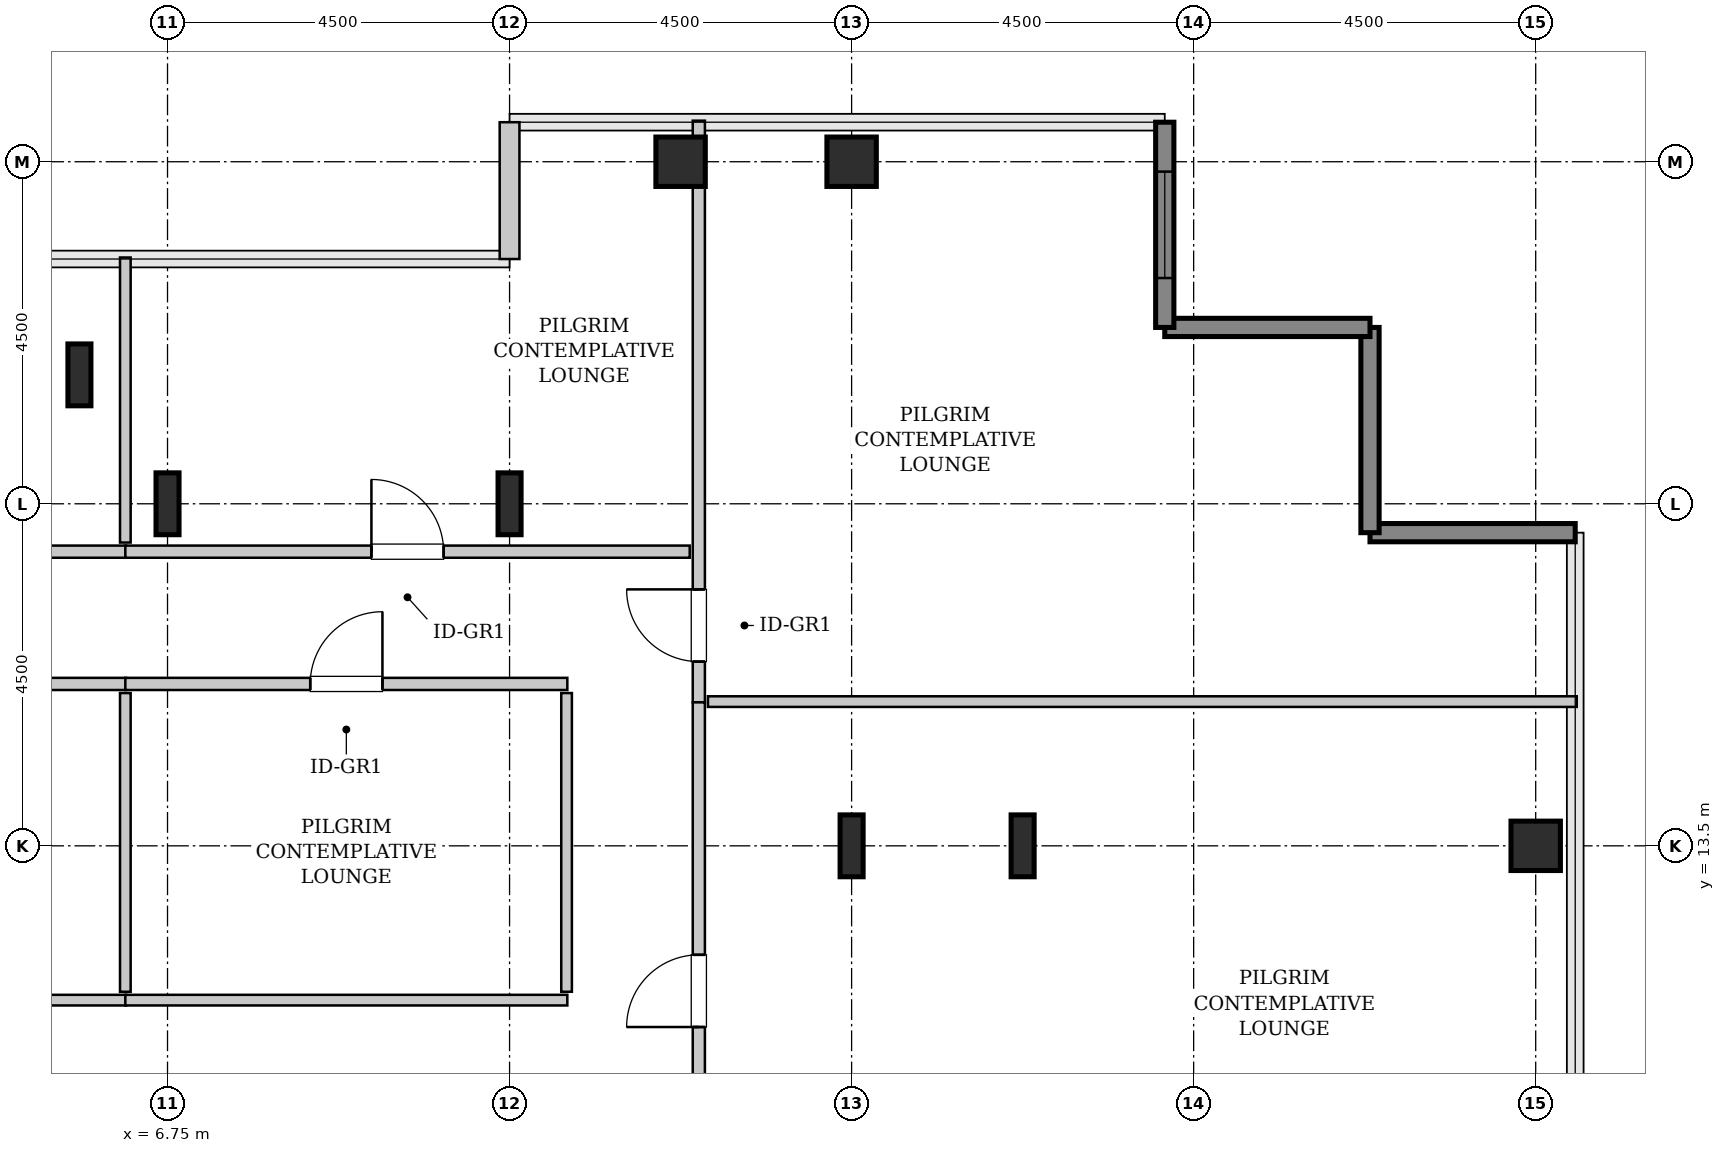
"""IFC4 building model, lengths in metres.
Left out: names, types, materials, properties, quantities, classifications, styles, units other than length and angle.
Written with IfcOpenShell. Run it as: python <this file> out.ifc"""

import sys

from ifc_helpers import new_model, si_unit, direction, frame, frame_2d, origin, origin_2d, place, context, subcontext, project, spatial, rectangle, hollow_rectangle, i_section, extrude, source, transform, mapped, element, fill, save


model = new_model("IFC4")
c1 = context("Model", 3, precision=1e-05, world=origin(), true_north=direction((0.0, 1.0)))
c2 = subcontext(c1, "Body", "Model", "MODEL_VIEW")
j1 = project(units=[si_unit("LENGTHUNIT", "METRE"), si_unit("PLANEANGLEUNIT", "RADIAN")], contexts=[c1])
p1 = place(None, origin())
s1 = spatial("IfcSite", under=j1, at=p1, CompositionType="ELEMENT")
p2 = place(p1, origin())
s2 = spatial("IfcBuilding", under=s1, at=p2, CompositionType="ELEMENT")
p3 = place(p2, frame((0.0, 0.0, 237.0)))
s3 = spatial("IfcBuildingStorey", under=s2, at=p3, CompositionType="ELEMENT", Elevation=237.0)
m1 = source(origin(), c2, "Body", "SweptSolid", [
    extrude(i_section(OverallWidth=0.303, OverallDepth=0.814, WebThickness=0.021, FlangeThickness=0.04, FilletRadius=0.03, at=origin_2d()), origin(), (0.0, 0.0, 1.0), 3.8),
])
for number, where, z_axis, x_axis in (
    (1, (5.591, 19.696, 0.0), (0.0, 0.0, 1.0), (1.0, 0.0, 0.0)),
    (2, (6.75, 18.0, 0.0), (0.0, 0.0, 1.0), (1.0, 0.0, 0.0)),
    (3, (11.25, 18.0, 0.0), (0.0, 0.0, 1.0), (1.0, 0.0, 0.0)),
):
    element("IfcColumn", number, at=place(p3, frame(where, z_axis=z_axis, x_axis=x_axis)), inside=s3, PredefinedType="COLUMN", context=c2, shape_type="MappedRepresentation", body=[
        mapped(m1, transform((0.0, 0.0, 0.0), x_axis=(1.0, 0.0, 0.0), y_axis=(0.0, 1.0, 0.0), z_axis=(0.0, 0.0, 1.0), scale=1.0)),
    ])
m2 = source(origin(), c2, "Body", "SweptSolid", [
    extrude(hollow_rectangle(XDim=0.65, YDim=0.65, WallThickness=0.032, InnerFilletRadius=0.032, OuterFilletRadius=0.064, at=origin_2d()), origin(), (0.0, 0.0, 1.0), 3.8),
])
p4 = place(p3, frame((13.5, 22.5, 0.0), z_axis=(0.0, 0.0, 1.0), x_axis=(1.0, 0.0, 0.0)))
e4 = element("IfcColumn", 4, at=p4, inside=s3, PredefinedType="COLUMN", context=c2, shape_type="MappedRepresentation", body=[
    mapped(m2, transform((0.0, 0.0, 0.0), x_axis=(1.0, 0.0, 0.0), y_axis=(0.0, 1.0, 0.0), z_axis=(0.0, 0.0, 1.0), scale=1.0)),
])
p5 = place(p3, frame((15.75, 13.5, 0.0), z_axis=(0.0, 0.0, 1.0), x_axis=(1.0, 0.0, 0.0)))
e5 = element("IfcColumn", 5, at=p5, inside=s3, PredefinedType="COLUMN", context=c2, shape_type="MappedRepresentation", body=[
    mapped(m1, transform((0.0, 0.0, 0.0), x_axis=(1.0, 0.0, 0.0), y_axis=(0.0, 1.0, 0.0), z_axis=(0.0, 0.0, 1.0), scale=1.0)),
])
p6 = place(p3, frame((15.75, 22.5, 0.0), z_axis=(0.0, 0.0, 1.0), x_axis=(1.0, 0.0, 0.0)))
e6 = element("IfcColumn", 6, at=p6, inside=s3, PredefinedType="COLUMN", context=c2, shape_type="MappedRepresentation", body=[
    mapped(m2, transform((0.0, 0.0, 0.0), x_axis=(1.0, 0.0, 0.0), y_axis=(0.0, 1.0, 0.0), z_axis=(0.0, 0.0, 1.0), scale=1.0)),
])
p7 = place(p3, frame((18.0, 13.5, 0.0), z_axis=(0.0, 0.0, 1.0), x_axis=(1.0, 0.0, 0.0)))
e7 = element("IfcColumn", 7, at=p7, inside=s3, PredefinedType="COLUMN", context=c2, shape_type="MappedRepresentation", body=[
    mapped(m1, transform((0.0, 0.0, 0.0), x_axis=(1.0, 0.0, 0.0), y_axis=(0.0, 1.0, 0.0), z_axis=(0.0, 0.0, 1.0), scale=1.0)),
])
p8 = place(p3, frame((24.75, 13.5, 0.0), z_axis=(0.0, 0.0, 1.0), x_axis=(1.0, 0.0, 0.0)))
e8 = element("IfcColumn", 8, at=p8, inside=s3, PredefinedType="COLUMN", context=c2, shape_type="MappedRepresentation", body=[
    mapped(m2, transform((0.0, 0.0, 0.0), x_axis=(1.0, 0.0, 0.0), y_axis=(0.0, 1.0, 0.0), z_axis=(0.0, 0.0, 1.0), scale=1.0)),
])
m3 = source(origin(), c2, "Body", "SweptSolid", [
    extrude(rectangle(XDim=2.7, YDim=0.24, at=frame_2d((1.35, 0.0))), origin(), (0.0, 0.0, 1.0), 3.55),
])
for number, where, z_axis, x_axis in (
    (9, (25.27, 17.62, 0.0), (0.0, 0.0, 1.0), (-1.0, 0.0, 0.0)),
    (10, (22.57, 17.62, 0.0), (0.0, 0.0, 1.0), (0.0, 1.0, 0.0)),
    (11, (22.57, 20.32, 0.0), (0.0, 0.0, 1.0), (-1.0, 0.0, 0.0)),
):
    element("IfcWall", number, at=place(p3, frame(where, z_axis=z_axis, x_axis=x_axis)), inside=s3, PredefinedType="SHEAR", context=c2, shape_type="MappedRepresentation", body=[
        mapped(m3, transform((0.0, 0.0, 0.0), x_axis=(1.0, 0.0, 0.0), y_axis=(0.0, 1.0, 0.0), z_axis=(0.0, 0.0, 1.0), scale=1.0)),
    ])
p9 = place(p3, frame((19.87, 20.32, 0.0), z_axis=(0.0, 0.0, 1.0), x_axis=(0.0, 1.0, 0.0)))
e12 = element("IfcWall", 12, at=p9, inside=s3, PredefinedType="SHEAR", context=c2, shape_type="MappedRepresentation", body=[
    mapped(m3, transform((0.0, 0.0, 0.0), x_axis=(1.0, 0.0, 0.0), y_axis=(0.0, 1.0, 0.0), z_axis=(0.0, 0.0, 1.0), scale=1.0)),
])
p10 = place(p9, frame((0.65, 0.0, 0.85)))
e13 = element("IfcOpeningElement", 13, at=p10, cuts=e12, PredefinedType="OPENING", context=c2, shape_type="SweptSolid", body=[
    extrude(rectangle(XDim=1.4, YDim=1.8, at=frame_2d((0.7, 0.9))), frame((0.0, 0.13, 0.0), z_axis=(0.0, -1.0, 0.0), x_axis=(1.0, 0.0, 0.0)), (0.0, 0.0, 1.0), 0.26),
])
m4 = source(origin(), c2, "Body", "SweptSolid", [
    extrude(rectangle(XDim=1.8, YDim=0.26, at=frame_2d((0.9, 0.0))), origin(), (0.0, 0.0, 1.0), 3.55),
])
p11 = place(p3, frame((11.25, 23.02, 0.0), z_axis=(0.0, 0.0, 1.0), x_axis=(0.0, -1.0, 0.0)))
e14 = element("IfcWall", 14, at=p11, inside=s3, PredefinedType="SOLIDWALL", context=c2, shape_type="MappedRepresentation", body=[
    mapped(m4, transform((0.0, 0.0, 0.0), x_axis=(1.0, 0.0, 0.0), y_axis=(0.0, 1.0, 0.0), z_axis=(0.0, 0.0, 1.0), scale=1.0)),
])
m5 = source(origin(), c2, "Body", "SweptSolid", [
    extrude(rectangle(XDim=7.653, YDim=0.16, at=frame_2d((3.826, 0.0))), origin(), (0.0, 0.0, 1.0), 3.535),
])
p12 = place(p3, frame((13.74, 15.387, 0.0), z_axis=(0.0, 0.0, 1.0), x_axis=(0.0, 1.0, 0.0)))
e15 = element("IfcWall", 15, at=p12, inside=s3, PredefinedType="PARTITIONING", context=c2, shape_type="MappedRepresentation", body=[
    mapped(m5, transform((0.0, 0.0, 0.0), x_axis=(1.0, 0.0, 0.0), y_axis=(0.0, 1.0, 0.0), z_axis=(0.0, 0.0, 1.0), scale=1.0)),
])
p13 = place(p12, frame((0.536, 0.0, 0.0)))
e16 = element("IfcOpeningElement", 16, at=p13, cuts=e15, PredefinedType="OPENING", context=c2, shape_type="SweptSolid", body=[
    extrude(rectangle(XDim=0.95, YDim=2.1, at=frame_2d((0.475, 1.05))), frame((0.0, 0.09, 0.0), z_axis=(0.0, -1.0, 0.0), x_axis=(1.0, 0.0, 0.0)), (0.0, 0.0, 1.0), 0.18),
])
m6 = source(origin(), c2, "Body", "SweptSolid", [
    extrude(rectangle(XDim=11.43, YDim=0.14, at=frame_2d((5.715, 0.0))), origin(), (0.0, 0.0, 1.0), 3.535),
])
p14 = place(p3, frame((13.86, 15.397, 0.0), z_axis=(0.0, 0.0, 1.0), x_axis=(1.0, 0.0, 0.0)))
e17 = element("IfcWall", 17, at=p14, inside=s3, PredefinedType="PARTITIONING", context=c2, shape_type="MappedRepresentation", body=[
    mapped(m6, transform((0.0, 0.0, 0.0), x_axis=(1.0, 0.0, 0.0), y_axis=(0.0, 1.0, 0.0), z_axis=(0.0, 0.0, 1.0), scale=1.0)),
])
m7 = source(origin(), c2, "Body", "SweptSolid", [
    extrude(rectangle(XDim=7.593, YDim=0.16, at=frame_2d((3.796, 0.0))), origin(), (0.0, 0.0, 1.0), 3.535),
])
p15 = place(p3, frame((13.74, 7.795, 0.0), z_axis=(0.0, 0.0, 1.0), x_axis=(0.0, 1.0, 0.0)))
e18 = element("IfcWall", 18, at=p15, inside=s3, PredefinedType="PARTITIONING", context=c2, shape_type="MappedRepresentation", body=[
    mapped(m7, transform((0.0, 0.0, 0.0), x_axis=(1.0, 0.0, 0.0), y_axis=(0.0, 1.0, 0.0), z_axis=(0.0, 0.0, 1.0), scale=1.0)),
])
p16 = place(p15, frame((3.321, 0.0, 0.0)))
e19 = element("IfcOpeningElement", 19, at=p16, cuts=e18, PredefinedType="OPENING", context=c2, shape_type="SweptSolid", body=[
    extrude(rectangle(XDim=0.95, YDim=2.1, at=frame_2d((0.475, 1.05))), frame((0.0, 0.09, 0.0), z_axis=(0.0, -1.0, 0.0), x_axis=(1.0, 0.0, 0.0)), (0.0, 0.0, 1.0), 0.18),
])
m8 = source(origin(), c2, "Body", "SweptSolid", [
    extrude(rectangle(XDim=8.01, YDim=0.16, at=frame_2d((4.005, 0.0))), origin(), (0.0, 0.0, 1.0), 3.535),
])
p17 = place(p3, frame((-1.805, 17.37, 0.0), z_axis=(0.0, 0.0, 1.0), x_axis=(1.0, 0.0, 0.0)))
e20 = element("IfcWall", 20, at=p17, inside=s3, PredefinedType="PARTITIONING", context=c2, shape_type="MappedRepresentation", body=[
    mapped(m8, transform((0.0, 0.0, 0.0), x_axis=(1.0, 0.0, 0.0), y_axis=(0.0, 1.0, 0.0), z_axis=(0.0, 0.0, 1.0), scale=1.0)),
])
p18 = place(p17, frame((2.49, 0.0, 0.0)))
e21 = element("IfcOpeningElement", 21, at=p18, cuts=e20, PredefinedType="OPENING", context=c2, shape_type="SweptSolid", body=[
    extrude(rectangle(XDim=0.95, YDim=2.1, at=frame_2d((0.475, 1.05))), frame((0.0, 0.09, 0.0), z_axis=(0.0, -1.0, 0.0), x_axis=(1.0, 0.0, 0.0)), (0.0, 0.0, 1.0), 0.18),
])
m9 = source(origin(), c2, "Body", "SweptSolid", [
    extrude(rectangle(XDim=3.75, YDim=0.14, at=frame_2d((1.875, 0.0))), origin(), (0.0, 0.0, 1.0), 3.535),
])
p19 = place(p3, frame((6.195, 17.49, 0.0), z_axis=(0.0, 0.0, 1.0), x_axis=(0.0, 1.0, 0.0)))
e22 = element("IfcWall", 22, at=p19, inside=s3, PredefinedType="PARTITIONING", context=c2, shape_type="MappedRepresentation", body=[
    mapped(m9, transform((0.0, 0.0, 0.0), x_axis=(1.0, 0.0, 0.0), y_axis=(0.0, 1.0, 0.0), z_axis=(0.0, 0.0, 1.0), scale=1.0)),
])
p20 = place(p3, frame((-1.805, 15.63, 0.0), z_axis=(0.0, 0.0, 1.0), x_axis=(1.0, 0.0, 0.0)))
e23 = element("IfcWall", 23, at=p20, inside=s3, PredefinedType="PARTITIONING", context=c2, shape_type="MappedRepresentation", body=[
    mapped(m8, transform((0.0, 0.0, 0.0), x_axis=(1.0, 0.0, 0.0), y_axis=(0.0, 1.0, 0.0), z_axis=(0.0, 0.0, 1.0), scale=1.0)),
])
p21 = place(p20, frame((3.53, 0.0, 0.0)))
e24 = element("IfcOpeningElement", 24, at=p21, cuts=e23, PredefinedType="OPENING", context=c2, shape_type="SweptSolid", body=[
    extrude(rectangle(XDim=0.95, YDim=2.1, at=frame_2d((0.475, 1.05))), frame((0.0, 0.09, 0.0), z_axis=(0.0, -1.0, 0.0), x_axis=(1.0, 0.0, 0.0)), (0.0, 0.0, 1.0), 0.18),
])
m10 = source(origin(), c2, "Body", "SweptSolid", [
    extrude(rectangle(XDim=8.01, YDim=0.14, at=frame_2d((4.005, 0.0))), origin(), (0.0, 0.0, 1.0), 3.535),
])
p22 = place(p3, frame((-1.805, 11.47, 0.0), z_axis=(0.0, 0.0, 1.0), x_axis=(1.0, 0.0, 0.0)))
e25 = element("IfcWall", 25, at=p22, inside=s3, PredefinedType="PARTITIONING", context=c2, shape_type="MappedRepresentation", body=[
    mapped(m10, transform((0.0, 0.0, 0.0), x_axis=(1.0, 0.0, 0.0), y_axis=(0.0, 1.0, 0.0), z_axis=(0.0, 0.0, 1.0), scale=1.0)),
])
m11 = source(origin(), c2, "Body", "SweptSolid", [
    extrude(rectangle(XDim=3.93, YDim=0.14, at=frame_2d((1.965, 0.0))), origin(), (0.0, 0.0, 1.0), 3.535),
])
p23 = place(p3, frame((6.195, 11.58, 0.0), z_axis=(0.0, 0.0, 1.0), x_axis=(0.0, 1.0, 0.0)))
e26 = element("IfcWall", 26, at=p23, inside=s3, PredefinedType="PARTITIONING", context=c2, shape_type="MappedRepresentation", body=[
    mapped(m11, transform((0.0, 0.0, 0.0), x_axis=(1.0, 0.0, 0.0), y_axis=(0.0, 1.0, 0.0), z_axis=(0.0, 0.0, 1.0), scale=1.0)),
])
m12 = source(origin(), c2, "Body", "SweptSolid", [
    extrude(rectangle(XDim=7.425, YDim=0.16, at=frame_2d((3.712, 0.0))), origin(), (0.0, 0.0, 1.0), 3.535),
])
p24 = place(p3, frame((6.195, 17.37, 0.0), z_axis=(0.0, 0.0, 1.0), x_axis=(1.0, 0.0, 0.0)))
e27 = element("IfcWall", 27, at=p24, inside=s3, PredefinedType="PARTITIONING", context=c2, shape_type="MappedRepresentation", body=[
    mapped(m12, transform((0.0, 0.0, 0.0), x_axis=(1.0, 0.0, 0.0), y_axis=(0.0, 1.0, 0.0), z_axis=(0.0, 0.0, 1.0), scale=1.0)),
])
p25 = place(p24, frame((3.238, 0.0, 0.0)))
e28 = element("IfcOpeningElement", 28, at=p25, cuts=e27, PredefinedType="OPENING", context=c2, shape_type="SweptSolid", body=[
    extrude(rectangle(XDim=0.95, YDim=2.1, at=frame_2d((0.475, 1.05))), frame((0.0, 0.09, 0.0), z_axis=(0.0, -1.0, 0.0), x_axis=(1.0, 0.0, 0.0)), (0.0, 0.0, 1.0), 0.18),
])
m13 = source(origin(), c2, "Body", "SweptSolid", [
    extrude(rectangle(XDim=5.815, YDim=0.16, at=frame_2d((2.907, 0.0))), origin(), (0.0, 0.0, 1.0), 3.535),
])
p26 = place(p3, frame((6.195, 15.63, 0.0), z_axis=(0.0, 0.0, 1.0), x_axis=(1.0, 0.0, 0.0)))
e29 = element("IfcWall", 29, at=p26, inside=s3, PredefinedType="PARTITIONING", context=c2, shape_type="MappedRepresentation", body=[
    mapped(m13, transform((0.0, 0.0, 0.0), x_axis=(1.0, 0.0, 0.0), y_axis=(0.0, 1.0, 0.0), z_axis=(0.0, 0.0, 1.0), scale=1.0)),
])
p27 = place(p26, frame((2.433, 0.0, 0.0)))
e30 = element("IfcOpeningElement", 30, at=p27, cuts=e29, PredefinedType="OPENING", context=c2, shape_type="SweptSolid", body=[
    extrude(rectangle(XDim=0.95, YDim=2.1, at=frame_2d((0.475, 1.05))), frame((0.0, 0.09, 0.0), z_axis=(0.0, -1.0, 0.0), x_axis=(1.0, 0.0, 0.0)), (0.0, 0.0, 1.0), 0.18),
])
m14 = source(origin(), c2, "Body", "SweptSolid", [
    extrude(rectangle(XDim=5.815, YDim=0.14, at=frame_2d((2.907, 0.0))), origin(), (0.0, 0.0, 1.0), 3.535),
])
p28 = place(p3, frame((6.195, 11.47, 0.0), z_axis=(0.0, 0.0, 1.0), x_axis=(1.0, 0.0, 0.0)))
e31 = element("IfcWall", 31, at=p28, inside=s3, PredefinedType="PARTITIONING", context=c2, shape_type="MappedRepresentation", body=[
    mapped(m14, transform((0.0, 0.0, 0.0), x_axis=(1.0, 0.0, 0.0), y_axis=(0.0, 1.0, 0.0), z_axis=(0.0, 0.0, 1.0), scale=1.0)),
])
p29 = place(p3, frame((12.0, 11.58, 0.0), z_axis=(0.0, 0.0, 1.0), x_axis=(0.0, 1.0, 0.0)))
e32 = element("IfcWall", 32, at=p29, inside=s3, PredefinedType="PARTITIONING", context=c2, shape_type="MappedRepresentation", body=[
    mapped(m11, transform((0.0, 0.0, 0.0), x_axis=(1.0, 0.0, 0.0), y_axis=(0.0, 1.0, 0.0), z_axis=(0.0, 0.0, 1.0), scale=1.0)),
])
m15 = source(origin(), c2, "Body", "SweptSolid", [
    extrude(rectangle(XDim=1.4, YDim=1.8, at=frame_2d((0.7, 0.9))), frame((0.0, 0.03, 0.0), z_axis=(0.0, -1.0, 0.0), x_axis=(1.0, 0.0, 0.0)), (0.0, 0.0, 1.0), 0.06),
])
p30 = place(p10, origin())
e33 = element("IfcWindow", 33, at=p30, inside=s3, PartitioningType="SINGLE_PANEL", PredefinedType="WINDOW", context=c2, shape_type="MappedRepresentation", body=[
    mapped(m15, transform((0.0, 0.0, 0.0), x_axis=(1.0, 0.0, 0.0), y_axis=(0.0, 1.0, 0.0), z_axis=(0.0, 0.0, 1.0), scale=1.0)),
])
fill(e13, e33)
m16 = source(origin(), c2, "Body", "SweptSolid", [
    extrude(rectangle(XDim=0.95, YDim=2.1, at=frame_2d((0.475, 1.05))), frame((0.0, 0.025, 0.0), z_axis=(0.0, -1.0, 0.0), x_axis=(1.0, 0.0, 0.0)), (0.0, 0.0, 1.0), 0.05),
])
p31 = place(p13, origin())
e34 = element("IfcDoor", 34, at=p31, inside=s3, OperationType="SINGLE_SWING_RIGHT", PredefinedType="DOOR", context=c2, shape_type="MappedRepresentation", body=[
    mapped(m16, transform((0.0, 0.0, 0.0), x_axis=(1.0, 0.0, 0.0), y_axis=(0.0, 1.0, 0.0), z_axis=(0.0, 0.0, 1.0), scale=1.0)),
])
fill(e16, e34)
p32 = place(p16, origin())
e35 = element("IfcDoor", 35, at=p32, inside=s3, OperationType="SINGLE_SWING_LEFT", PredefinedType="DOOR", context=c2, shape_type="MappedRepresentation", body=[
    mapped(m16, transform((0.0, 0.0, 0.0), x_axis=(1.0, 0.0, 0.0), y_axis=(0.0, 1.0, 0.0), z_axis=(0.0, 0.0, 1.0), scale=1.0)),
])
fill(e19, e35)
p33 = place(p25, origin())
e36 = element("IfcDoor", 36, at=p33, inside=s3, OperationType="SINGLE_SWING_LEFT", PredefinedType="DOOR", context=c2, shape_type="MappedRepresentation", body=[
    mapped(m16, transform((0.0, 0.0, 0.0), x_axis=(1.0, 0.0, 0.0), y_axis=(0.0, 1.0, 0.0), z_axis=(0.0, 0.0, 1.0), scale=1.0)),
])
fill(e28, e36)
p34 = place(p27, origin())
e37 = element("IfcDoor", 37, at=p34, inside=s3, OperationType="SINGLE_SWING_RIGHT", PredefinedType="DOOR", context=c2, shape_type="MappedRepresentation", body=[
    mapped(m16, transform((0.0, 0.0, 0.0), x_axis=(1.0, 0.0, 0.0), y_axis=(0.0, 1.0, 0.0), z_axis=(0.0, 0.0, 1.0), scale=1.0)),
])
fill(e30, e37)
save(model, sys.argv[1])
